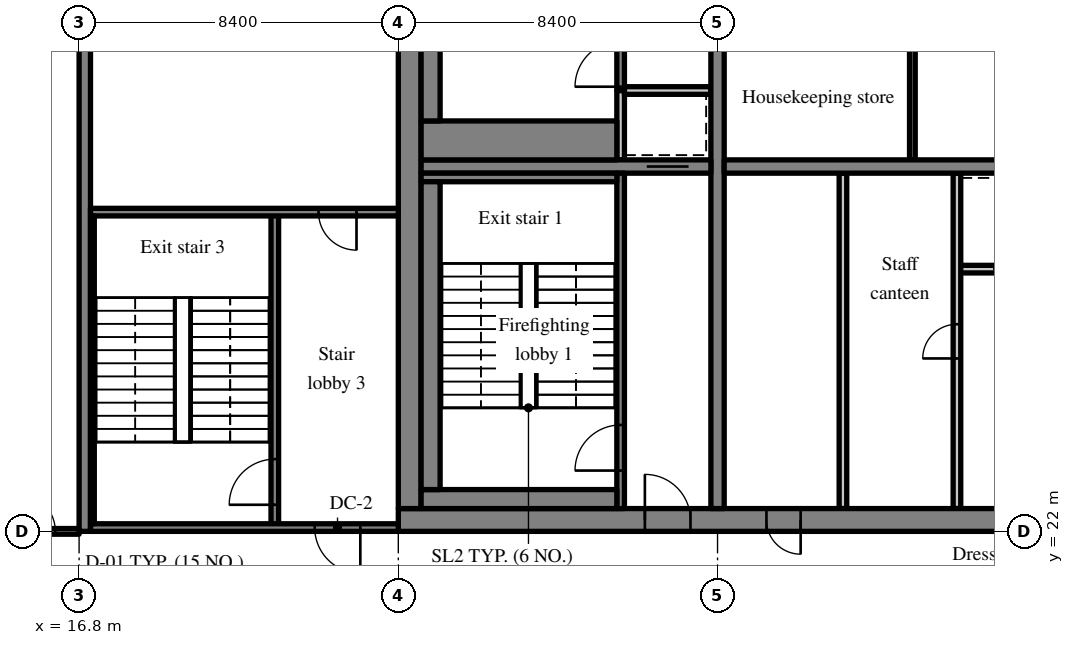
"""IFC4 building model, lengths in metres.
Left out: names, types, materials, properties, quantities, classifications, styles, units other than length and angle.
Written with IfcOpenShell. Run it as: python <this file> out.ifc"""

import sys

from ifc_helpers import new_model, si_unit, direction, frame, frame_2d, origin, place, context, subcontext, project, spatial, rectangle, extrude, source, transform, mapped, element, fill, save


model = new_model("IFC4")
c1 = context("Model", 3, precision=1e-05, world=origin(), true_north=direction((0.0, 1.0)))
c2 = subcontext(c1, "Body", "Model", "MODEL_VIEW")
j1 = project(units=[si_unit("LENGTHUNIT", "METRE"), si_unit("PLANEANGLEUNIT", "RADIAN")], contexts=[c1])
p1 = place(None, origin())
s1 = spatial("IfcSite", under=j1, at=p1, CompositionType="ELEMENT")
p2 = place(p1, origin())
s2 = spatial("IfcBuilding", under=s1, at=p2, CompositionType="ELEMENT")
p3 = place(p2, frame((0.0, 0.0, 260.8)))
s3 = spatial("IfcBuildingStorey", under=s2, at=p3, CompositionType="ELEMENT", Elevation=260.8)
m1 = source(origin(), c2, "Body", "SweptSolid", [
    extrude(rectangle(XDim=50.4, YDim=0.6, at=frame_2d((25.2, 0.0))), origin(), (0.0, 0.0, 1.0), 3.62),
])
p4 = place(p3, frame((25.2, 22.3, 0.0), z_axis=(0.0, 0.0, 1.0), x_axis=(1.0, 0.0, 0.0)))
e1 = element("IfcWall", 1, at=p4, inside=s3, PredefinedType="SHEAR", context=c2, shape_type="MappedRepresentation", body=[
    mapped(m1, transform((0.0, 0.0, 0.0), scale=1.0)),
])
m2 = source(origin(), c2, "Body", "SweptSolid", [
    extrude(rectangle(XDim=1.8, YDim=2.1, at=frame_2d((0.9, 1.05))), frame((0.0, 0.31, 0.0), z_axis=(0.0, -1.0, 0.0), x_axis=(1.0, 0.0, 0.0)), (0.0, 0.0, 1.0), 0.62),
])
p5 = place(p4, frame((15.9, 0.0, 0.0)))
e2 = element("IfcOpeningElement", 2, at=p5, cuts=e1, PredefinedType="OPENING", context=c2, shape_type="MappedRepresentation", body=[
    mapped(m2, transform((0.0, 0.0, 0.0), scale=1.0)),
])
m3 = source(origin(), c2, "Body", "SweptSolid", [
    extrude(rectangle(XDim=0.9, YDim=2.1, at=frame_2d((0.45, 1.05))), frame((0.0, 0.31, 0.0), z_axis=(0.0, -1.0, 0.0), x_axis=(1.0, 0.0, 0.0)), (0.0, 0.0, 1.0), 0.62),
])
p6 = place(p4, frame((9.687, 0.0, 0.0)))
e3 = element("IfcOpeningElement", 3, at=p6, cuts=e1, PredefinedType="OPENING", context=c2, shape_type="MappedRepresentation", body=[
    mapped(m3, transform((0.0, 0.0, 0.0), scale=1.0)),
])
p7 = place(p4, frame((21.513, 0.0, 0.0)))
e4 = element("IfcOpeningElement", 4, at=p7, cuts=e1, PredefinedType="OPENING", context=c2, shape_type="MappedRepresentation", body=[
    mapped(m3, transform((0.0, 0.0, 0.0), scale=1.0)),
])
p8 = place(p4, frame((32.7, 0.0, 0.0)))
e5 = element("IfcOpeningElement", 5, at=p8, cuts=e1, PredefinedType="OPENING", context=c2, shape_type="MappedRepresentation", body=[
    mapped(m2, transform((0.0, 0.0, 0.0), scale=1.0)),
])
m4 = source(origin(), c2, "Body", "SweptSolid", [
    extrude(rectangle(XDim=1.2, YDim=2.1, at=frame_2d((0.6, 1.05))), frame((0.0, 0.31, 0.0), z_axis=(0.0, -1.0, 0.0), x_axis=(1.0, 0.0, 0.0)), (0.0, 0.0, 1.0), 0.62),
])
p9 = place(p4, frame((6.488, 0.0, 0.0)))
e6 = element("IfcOpeningElement", 6, at=p9, cuts=e1, PredefinedType="OPENING", context=c2, shape_type="MappedRepresentation", body=[
    mapped(m4, transform((0.0, 0.0, 0.0), scale=1.0)),
])
p10 = place(p4, frame((47.925, 0.0, 0.0)))
e7 = element("IfcOpeningElement", 7, at=p10, cuts=e1, PredefinedType="OPENING", context=c2, shape_type="MappedRepresentation", body=[
    mapped(m4, transform((0.0, 0.0, 0.0), scale=1.0)),
])
m5 = source(origin(), c2, "Body", "SweptSolid", [
    extrude(rectangle(XDim=18.8, YDim=0.6, at=frame_2d((9.4, 0.0))), origin(), (0.0, 0.0, 1.0), 3.62),
])
p11 = place(p3, frame((25.5, 22.6, 0.0), z_axis=(0.0, 0.0, 1.0), x_axis=(0.0, 1.0, 0.0)))
e8 = element("IfcWall", 8, at=p11, inside=s3, PredefinedType="SHEAR", context=c2, shape_type="MappedRepresentation", body=[
    mapped(m5, transform((0.0, 0.0, 0.0), scale=1.0)),
])
m6 = source(origin(), c2, "Body", "SweptSolid", [
    extrude(rectangle(XDim=18.8, YDim=0.35, at=frame_2d((9.4, 0.0))), origin(), (0.0, 0.0, 1.0), 3.62),
])
p12 = place(p3, frame((33.6, 22.6, 0.0), z_axis=(0.0, 0.0, 1.0), x_axis=(0.0, 1.0, 0.0)))
e9 = element("IfcWall", 9, at=p12, inside=s3, PredefinedType="SHEAR", context=c2, shape_type="MappedRepresentation", body=[
    mapped(m6, transform((0.0, 0.0, 0.0), scale=1.0)),
])
m7 = source(origin(), c2, "Body", "SweptSolid", [
    extrude(rectangle(XDim=1.1, YDim=2.1, at=frame_2d((0.55, 1.05))), frame((0.0, 0.185, 0.0), z_axis=(0.0, -1.0, 0.0), x_axis=(1.0, 0.0, 0.0)), (0.0, 0.0, 1.0), 0.37),
])
p13 = place(p12, frame((12.85, 0.0, 0.0)))
e10 = element("IfcOpeningElement", 10, at=p13, cuts=e9, PredefinedType="OPENING", context=c2, shape_type="MappedRepresentation", body=[
    mapped(m7, transform((0.0, 0.0, 0.0), scale=1.0)),
])
m8 = source(origin(), c2, "Body", "SweptSolid", [
    extrude(rectangle(XDim=7.625, YDim=0.35, at=frame_2d((3.812, 0.0))), origin(), (0.0, 0.0, 1.0), 3.62),
])
p14 = place(p3, frame((25.8, 31.6, 0.0), z_axis=(0.0, 0.0, 1.0), x_axis=(1.0, 0.0, 0.0)))
e11 = element("IfcWall", 11, at=p14, inside=s3, PredefinedType="SHEAR", context=c2, shape_type="MappedRepresentation", body=[
    mapped(m8, transform((0.0, 0.0, 0.0), scale=1.0)),
])
p15 = place(p14, frame((5.938, 0.0, 0.0)))
e12 = element("IfcOpeningElement", 12, at=p15, cuts=e11, PredefinedType="OPENING", context=c2, shape_type="MappedRepresentation", body=[
    mapped(m7, transform((0.0, 0.0, 0.0), scale=1.0)),
])
m9 = source(origin(), c2, "Body", "SweptSolid", [
    extrude(rectangle(XDim=16.45, YDim=0.35, at=frame_2d((8.225, 0.0))), origin(), (0.0, 0.0, 1.0), 3.62),
])
p16 = place(p3, frame((33.775, 31.6, 0.0), z_axis=(0.0, 0.0, 1.0), x_axis=(1.0, 0.0, 0.0)))
e13 = element("IfcWall", 13, at=p16, inside=s3, PredefinedType="SHEAR", context=c2, shape_type="MappedRepresentation", body=[
    mapped(m9, transform((0.0, 0.0, 0.0), scale=1.0)),
])
m10 = source(origin(), c2, "Body", "SweptSolid", [
    extrude(rectangle(XDim=1.0, YDim=2.1, at=frame_2d((0.5, 1.05))), frame((0.0, 0.185, 0.0), z_axis=(0.0, -1.0, 0.0), x_axis=(1.0, 0.0, 0.0)), (0.0, 0.0, 1.0), 0.37),
])
p17 = place(p16, frame((14.837, 0.0, 0.0)))
e14 = element("IfcOpeningElement", 14, at=p17, cuts=e13, PredefinedType="OPENING", context=c2, shape_type="MappedRepresentation", body=[
    mapped(m10, transform((0.0, 0.0, 0.0), scale=1.0)),
])
m11 = source(origin(), c2, "Body", "SweptSolid", [
    extrude(rectangle(XDim=18.4, YDim=0.3, at=frame_2d((9.2, 0.0))), origin(), (0.0, 0.0, 1.0), 3.62),
])
p18 = place(p3, frame((16.95, 22.0, 0.0), z_axis=(0.0, 0.0, 1.0), x_axis=(0.0, 1.0, 0.0)))
e15 = element("IfcWall", 15, at=p18, inside=s3, PredefinedType="SHEAR", context=c2, shape_type="MappedRepresentation", body=[
    mapped(m11, transform((0.0, 0.0, 0.0), scale=1.0)),
])
m12 = source(origin(), c2, "Body", "SweptSolid", [
    extrude(rectangle(XDim=6.0, YDim=0.2, at=frame_2d((3.0, 0.0))), origin(), (0.0, 0.0, 1.0), 3.62),
])
p19 = place(p3, frame((39.9, 28.9, 0.0), z_axis=(0.0, 0.0, 1.0), x_axis=(1.0, 0.0, 0.0)))
e16 = element("IfcWall", 16, at=p19, inside=s3, PredefinedType="SOLIDWALL", context=c2, shape_type="MappedRepresentation", body=[
    mapped(m12, transform((0.0, 0.0, 0.0), scale=1.0)),
])
m13 = source(origin(), c2, "Body", "SweptSolid", [
    extrude(rectangle(XDim=1.1, YDim=2.1, at=frame_2d((0.55, 1.05))), frame((0.0, 0.11, 0.0), z_axis=(0.0, -1.0, 0.0), x_axis=(1.0, 0.0, 0.0)), (0.0, 0.0, 1.0), 0.22),
])
p20 = place(p19, frame((0.95, 0.0, 0.0)))
e17 = element("IfcOpeningElement", 17, at=p20, cuts=e16, PredefinedType="OPENING", context=c2, shape_type="MappedRepresentation", body=[
    mapped(m13, transform((0.0, 0.0, 0.0), scale=1.0)),
])
p21 = place(p19, frame((3.95, 0.0, 0.0)))
e18 = element("IfcOpeningElement", 18, at=p21, cuts=e16, PredefinedType="OPENING", context=c2, shape_type="MappedRepresentation", body=[
    mapped(m13, transform((0.0, 0.0, 0.0), scale=1.0)),
])
m14 = source(origin(), c2, "Body", "SweptSolid", [
    extrude(rectangle(XDim=8.825, YDim=0.2, at=frame_2d((4.413, 0.0))), origin(), (0.0, 0.0, 1.0), 3.62),
])
p22 = place(p3, frame((39.9, 22.6, 0.0), z_axis=(0.0, 0.0, 1.0), x_axis=(0.0, 1.0, 0.0)))
e19 = element("IfcWall", 19, at=p22, inside=s3, PredefinedType="PARTITIONING", context=c2, shape_type="MappedRepresentation", body=[
    mapped(m14, transform((0.0, 0.0, 0.0), scale=1.0)),
])
m15 = source(origin(), c2, "Body", "SweptSolid", [
    extrude(rectangle(XDim=0.9, YDim=2.1, at=frame_2d((0.45, 1.05))), frame((0.0, 0.11, 0.0), z_axis=(0.0, -1.0, 0.0), x_axis=(1.0, 0.0, 0.0)), (0.0, 0.0, 1.0), 0.22),
])
p23 = place(p22, frame((3.95, 0.0, 0.0)))
e20 = element("IfcOpeningElement", 20, at=p23, cuts=e19, PredefinedType="OPENING", context=c2, shape_type="MappedRepresentation", body=[
    mapped(m15, transform((0.0, 0.0, 0.0), scale=1.0)),
])
p24 = place(p3, frame((36.9, 22.6, 0.0), z_axis=(0.0, 0.0, 1.0), x_axis=(0.0, 1.0, 0.0)))
e21 = element("IfcWall", 21, at=p24, inside=s3, PredefinedType="PARTITIONING", context=c2, shape_type="MappedRepresentation", body=[
    mapped(m14, transform((0.0, 0.0, 0.0), scale=1.0)),
])
m16 = source(origin(), c2, "Body", "SweptSolid", [
    extrude(rectangle(XDim=3.225, YDim=0.15, at=frame_2d((1.613, 0.0))), origin(), (0.0, 0.0, 1.0), 3.62),
])
p25 = place(p3, frame((38.727, 31.775, 0.0), z_axis=(0.0, 0.0, 1.0), x_axis=(0.0, 1.0, 0.0)))
e22 = element("IfcWall", 22, at=p25, inside=s3, PredefinedType="PARTITIONING", context=c2, shape_type="MappedRepresentation", body=[
    mapped(m16, transform((0.0, 0.0, 0.0), scale=1.0)),
])
m17 = source(origin(), c2, "Body", "SweptSolid", [
    extrude(rectangle(XDim=8.825, YDim=0.2, at=frame_2d((4.413, 0.0))), origin(), (0.0, 0.0, 1.0), 3.62),
])
p26 = place(p3, frame((31.05, 22.6, 0.0), z_axis=(0.0, 0.0, 1.0), x_axis=(0.0, 1.0, 0.0)))
e23 = element("IfcWall", 23, at=p26, inside=s3, PredefinedType="SOLIDWALL", context=c2, shape_type="MappedRepresentation", body=[
    mapped(m17, transform((0.0, 0.0, 0.0), scale=1.0)),
])
m18 = source(origin(), c2, "Body", "SweptSolid", [
    extrude(rectangle(XDim=1.2, YDim=2.1, at=frame_2d((0.6, 1.05))), frame((0.0, 0.11, 0.0), z_axis=(0.0, -1.0, 0.0), x_axis=(1.0, 0.0, 0.0)), (0.0, 0.0, 1.0), 0.22),
])
p27 = place(p26, frame((1.0, 0.0, 0.0)))
e24 = element("IfcOpeningElement", 24, at=p27, cuts=e23, PredefinedType="OPENING", context=c2, shape_type="MappedRepresentation", body=[
    mapped(m18, transform((0.0, 0.0, 0.0), scale=1.0)),
])
m19 = source(origin(), c2, "Body", "SweptSolid", [
    extrude(rectangle(XDim=1.825, YDim=0.2, at=frame_2d((0.913, 0.0))), origin(), (0.0, 0.0, 1.0), 3.62),
])
p28 = place(p3, frame((31.05, 31.775, 0.0), z_axis=(0.0, 0.0, 1.0), x_axis=(0.0, 1.0, 0.0)))
e25 = element("IfcWall", 25, at=p28, inside=s3, PredefinedType="SOLIDWALL", context=c2, shape_type="MappedRepresentation", body=[
    mapped(m19, transform((0.0, 0.0, 0.0), scale=1.0)),
])
m20 = source(origin(), c2, "Body", "SweptSolid", [
    extrude(rectangle(XDim=2.275, YDim=0.2, at=frame_2d((1.138, 0.0))), origin(), (0.0, 0.0, 1.0), 3.62),
])
p29 = place(p3, frame((31.15, 33.6, 0.0), z_axis=(0.0, 0.0, 1.0), x_axis=(1.0, 0.0, 0.0)))
e26 = element("IfcWall", 26, at=p29, inside=s3, PredefinedType="SOLIDWALL", context=c2, shape_type="MappedRepresentation", body=[
    mapped(m20, transform((0.0, 0.0, 0.0), scale=1.0)),
])
m21 = source(origin(), c2, "Body", "SweptSolid", [
    extrude(rectangle(XDim=7.8, YDim=0.2, at=frame_2d((3.9, 0.0))), origin(), (0.0, 0.0, 1.0), 3.62),
])
p30 = place(p3, frame((31.05, 33.6, 0.0), z_axis=(0.0, 0.0, 1.0), x_axis=(0.0, 1.0, 0.0)))
e27 = element("IfcWall", 27, at=p30, inside=s3, PredefinedType="SOLIDWALL", context=c2, shape_type="MappedRepresentation", body=[
    mapped(m21, transform((0.0, 0.0, 0.0), scale=1.0)),
])
p31 = place(p30, frame((0.1, 0.0, 0.0)))
e28 = element("IfcOpeningElement", 28, at=p31, cuts=e27, PredefinedType="OPENING", context=c2, shape_type="MappedRepresentation", body=[
    mapped(m18, transform((0.0, 0.0, 0.0), scale=1.0)),
])
m22 = source(origin(), c2, "Body", "SweptSolid", [
    extrude(rectangle(XDim=8.3, YDim=0.2, at=frame_2d((4.15, 0.0))), origin(), (0.0, 0.0, 1.0), 3.62),
])
p32 = place(p3, frame((21.95, 22.1, 0.0), z_axis=(0.0, 0.0, 1.0), x_axis=(0.0, 1.0, 0.0)))
e29 = element("IfcWall", 29, at=p32, inside=s3, PredefinedType="SOLIDWALL", context=c2, shape_type="MappedRepresentation", body=[
    mapped(m22, transform((0.0, 0.0, 0.0), scale=1.0)),
])
p33 = place(p32, frame((0.6, 0.0, 0.0)))
e30 = element("IfcOpeningElement", 30, at=p33, cuts=e29, PredefinedType="OPENING", context=c2, shape_type="MappedRepresentation", body=[
    mapped(m18, transform((0.0, 0.0, 0.0), scale=1.0)),
])
m23 = source(origin(), c2, "Body", "SweptSolid", [
    extrude(rectangle(XDim=8.1, YDim=0.2, at=frame_2d((4.05, 0.0))), origin(), (0.0, 0.0, 1.0), 3.62),
])
p34 = place(p3, frame((17.1, 22.1, 0.0), z_axis=(0.0, 0.0, 1.0), x_axis=(1.0, 0.0, 0.0)))
e31 = element("IfcWall", 31, at=p34, inside=s3, PredefinedType="SOLIDWALL", context=c2, shape_type="MappedRepresentation", body=[
    mapped(m23, transform((0.0, 0.0, 0.0), scale=1.0)),
])
p35 = place(p34, frame((5.9, 0.0, 0.0)))
e32 = element("IfcOpeningElement", 32, at=p35, cuts=e31, PredefinedType="OPENING", context=c2, shape_type="MappedRepresentation", body=[
    mapped(m18, transform((0.0, 0.0, 0.0), scale=1.0)),
])
p36 = place(p3, frame((17.1, 30.4, 0.0), z_axis=(0.0, 0.0, 1.0), x_axis=(1.0, 0.0, 0.0)))
e33 = element("IfcWall", 33, at=p36, inside=s3, PredefinedType="SOLIDWALL", context=c2, shape_type="MappedRepresentation", body=[
    mapped(m23, transform((0.0, 0.0, 0.0), scale=1.0)),
])
m24 = source(origin(), c2, "Body", "SweptSolid", [
    extrude(rectangle(XDim=1.0, YDim=2.1, at=frame_2d((0.5, 1.05))), frame((0.0, 0.11, 0.0), z_axis=(0.0, -1.0, 0.0), x_axis=(1.0, 0.0, 0.0)), (0.0, 0.0, 1.0), 0.22),
])
p37 = place(p36, frame((6.0, 0.0, 0.0)))
e34 = element("IfcOpeningElement", 34, at=p37, cuts=e33, PredefinedType="OPENING", context=c2, shape_type="MappedRepresentation", body=[
    mapped(m24, transform((0.0, 0.0, 0.0), scale=1.0)),
])
m25 = source(origin(), c2, "Body", "SweptSolid", [
    extrude(rectangle(XDim=5.15, YDim=0.5, at=frame_2d((2.575, 0.0))), origin(), (0.0, 0.0, 1.0), 3.62),
])
p38 = place(p3, frame((25.8, 22.85, 0.0), z_axis=(0.0, 0.0, 1.0), x_axis=(1.0, 0.0, 0.0)))
e35 = element("IfcWall", 35, at=p38, inside=s3, PredefinedType="SOLIDWALL", context=c2, shape_type="MappedRepresentation", body=[
    mapped(m25, transform((0.0, 0.0, 0.0), scale=1.0)),
])
m26 = source(origin(), c2, "Body", "SweptSolid", [
    extrude(rectangle(XDim=5.15, YDim=0.225, at=frame_2d((2.575, 0.0))), origin(), (0.0, 0.0, 1.0), 3.62),
])
p39 = place(p3, frame((25.8, 31.312, 0.0), z_axis=(0.0, 0.0, 1.0), x_axis=(1.0, 0.0, 0.0)))
e36 = element("IfcWall", 36, at=p39, inside=s3, PredefinedType="SOLIDWALL", context=c2, shape_type="MappedRepresentation", body=[
    mapped(m26, transform((0.0, 0.0, 0.0), scale=1.0)),
])
m27 = source(origin(), c2, "Body", "SweptSolid", [
    extrude(rectangle(XDim=8.1, YDim=0.5, at=frame_2d((4.05, 0.0))), origin(), (0.0, 0.0, 1.0), 3.62),
])
p40 = place(p3, frame((26.05, 23.1, 0.0), z_axis=(0.0, 0.0, 1.0), x_axis=(0.0, 1.0, 0.0)))
e37 = element("IfcWall", 37, at=p40, inside=s3, PredefinedType="SOLIDWALL", context=c2, shape_type="MappedRepresentation", body=[
    mapped(m27, transform((0.0, 0.0, 0.0), scale=1.0)),
])
m28 = source(origin(), c2, "Body", "SweptSolid", [
    extrude(rectangle(XDim=8.1, YDim=0.1, at=frame_2d((4.05, 0.0))), origin(), (0.0, 0.0, 1.0), 3.62),
])
p41 = place(p3, frame((17.15, 22.2, 0.0), z_axis=(0.0, 0.0, 1.0), x_axis=(0.0, 1.0, 0.0)))
e38 = element("IfcWall", 38, at=p41, inside=s3, PredefinedType="SOLIDWALL", context=c2, shape_type="MappedRepresentation", body=[
    mapped(m28, transform((0.0, 0.0, 0.0), scale=1.0)),
])
m29 = source(origin(), c2, "Body", "SweptSolid", [
    extrude(rectangle(XDim=5.15, YDim=1.025, at=frame_2d((2.575, 0.0))), origin(), (0.0, 0.0, 1.0), 3.62),
])
p42 = place(p3, frame((25.8, 32.287, 0.0), z_axis=(0.0, 0.0, 1.0), x_axis=(1.0, 0.0, 0.0)))
e39 = element("IfcWall", 39, at=p42, inside=s3, PredefinedType="SOLIDWALL", context=c2, shape_type="MappedRepresentation", body=[
    mapped(m29, transform((0.0, 0.0, 0.0), scale=1.0)),
])
p43 = place(p3, frame((26.05, 32.8, 0.0), z_axis=(0.0, 0.0, 1.0), x_axis=(0.0, 1.0, 0.0)))
e40 = element("IfcWall", 40, at=p43, inside=s3, PredefinedType="SOLIDWALL", context=c2, shape_type="MappedRepresentation", body=[
    mapped(m27, transform((0.0, 0.0, 0.0), scale=1.0)),
])
m30 = source(origin(), c2, "Body", "SweptSolid", [
    extrude(rectangle(XDim=1.9, YDim=0.15, at=frame_2d((0.95, 0.0))), origin(), (0.0, 0.0, 1.0), 2.92),
])
p44 = place(p3, frame((14.9, 22.0, 0.0), z_axis=(0.0, 0.0, 1.0), x_axis=(1.0, 0.0, 0.0)))
e41 = element("IfcWall", 41, at=p44, inside=s3, PredefinedType="PARTITIONING", context=c2, shape_type="MappedRepresentation", body=[
    mapped(m30, transform((0.0, 0.0, 0.0), scale=1.0)),
])
m31 = source(origin(), c2, "Body", "SweptSolid", [
    extrude(rectangle(XDim=1.0, YDim=2.1, at=frame_2d((0.5, 1.05))), frame((0.0, 0.085, 0.0), z_axis=(0.0, -1.0, 0.0), x_axis=(1.0, 0.0, 0.0)), (0.0, 0.0, 1.0), 0.17),
])
p45 = place(p44, frame((0.275, 0.0, 0.0)))
e42 = element("IfcOpeningElement", 42, at=p45, cuts=e41, PredefinedType="OPENING", context=c2, shape_type="MappedRepresentation", body=[
    mapped(m31, transform((0.0, 0.0, 0.0), scale=1.0)),
])
m32 = source(origin(), c2, "Body", "SweptSolid", [
    extrude(rectangle(XDim=1.1, YDim=2.1, at=frame_2d((0.55, 1.05))), frame((0.0, 0.025, 0.0), z_axis=(0.0, -1.0, 0.0), x_axis=(1.0, 0.0, 0.0)), (0.0, 0.0, 1.0), 0.05),
])
p46 = place(p20, origin())
e43 = element("IfcDoor", 43, at=p46, inside=s3, OperationType="SLIDING_TO_LEFT", PredefinedType="DOOR", context=c2, shape_type="MappedRepresentation", body=[
    mapped(m32, transform((0.0, 0.0, 0.0), scale=1.0)),
])
fill(e17, e43)
m33 = source(origin(), c2, "Body", "SweptSolid", [
    extrude(rectangle(XDim=0.9, YDim=2.1, at=frame_2d((0.45, 1.05))), frame((0.0, 0.225, 0.0), z_axis=(0.0, -1.0, 0.0), x_axis=(1.0, 0.0, 0.0)), (0.0, 0.0, 1.0), 0.05),
])
p47 = place(p6, origin())
e44 = element("IfcDoor", 44, at=p47, inside=s3, OperationType="SINGLE_SWING_RIGHT", PredefinedType="DOOR", context=c2, shape_type="MappedRepresentation", body=[
    mapped(m33, transform((0.0, 0.0, 0.0), scale=1.0)),
])
fill(e3, e44)
m34 = source(origin(), c2, "Body", "SweptSolid", [
    extrude(rectangle(XDim=0.9, YDim=2.1, at=frame_2d((0.45, 1.05))), frame((0.0, 0.025, 0.0), z_axis=(0.0, -1.0, 0.0), x_axis=(1.0, 0.0, 0.0)), (0.0, 0.0, 1.0), 0.05),
])
p48 = place(p23, origin())
e45 = element("IfcDoor", 45, at=p48, inside=s3, OperationType="SINGLE_SWING_LEFT", PredefinedType="DOOR", context=c2, shape_type="MappedRepresentation", body=[
    mapped(m34, transform((0.0, 0.0, 0.0), scale=1.0)),
])
fill(e20, e45)
m35 = source(origin(), c2, "Body", "SweptSolid", [
    extrude(rectangle(XDim=1.2, YDim=2.1, at=frame_2d((0.6, 1.05))), frame((0.0, 0.025, 0.0), z_axis=(0.0, -1.0, 0.0), x_axis=(1.0, 0.0, 0.0)), (0.0, 0.0, 1.0), 0.05),
])
p49 = place(p27, origin())
e46 = element("IfcDoor", 46, at=p49, inside=s3, OperationType="SINGLE_SWING_LEFT", PredefinedType="DOOR", context=c2, shape_type="MappedRepresentation", body=[
    mapped(m35, transform((0.0, 0.0, 0.0), scale=1.0)),
])
fill(e24, e46)
m36 = source(origin(), c2, "Body", "SweptSolid", [
    extrude(rectangle(XDim=1.2, YDim=2.1, at=frame_2d((0.6, 1.05))), frame((0.0, 0.225, 0.0), z_axis=(0.0, -1.0, 0.0), x_axis=(1.0, 0.0, 0.0)), (0.0, 0.0, 1.0), 0.05),
])
p50 = place(p9, origin())
e47 = element("IfcDoor", 47, at=p50, inside=s3, OperationType="SINGLE_SWING_LEFT", PredefinedType="DOOR", context=c2, shape_type="MappedRepresentation", body=[
    mapped(m36, transform((0.0, 0.0, 0.0), scale=1.0)),
])
fill(e6, e47)
p51 = place(p15, origin())
e48 = element("IfcDoor", 48, at=p51, inside=s3, OperationType="SLIDING_TO_LEFT", PredefinedType="DOOR", context=c2, shape_type="MappedRepresentation", body=[
    mapped(m32, transform((0.0, 0.0, 0.0), scale=1.0)),
])
fill(e12, e48)
p52 = place(p31, origin())
e49 = element("IfcDoor", 49, at=p52, inside=s3, OperationType="SINGLE_SWING_LEFT", PredefinedType="DOOR", context=c2, shape_type="MappedRepresentation", body=[
    mapped(m35, transform((0.0, 0.0, 0.0), scale=1.0)),
])
fill(e28, e49)
p53 = place(p33, origin())
e50 = element("IfcDoor", 50, at=p53, inside=s3, OperationType="SINGLE_SWING_LEFT", PredefinedType="DOOR", context=c2, shape_type="MappedRepresentation", body=[
    mapped(m35, transform((0.0, 0.0, 0.0), scale=1.0)),
])
fill(e30, e50)
p54 = place(p35, origin())
e51 = element("IfcDoor", 51, at=p54, inside=s3, OperationType="SINGLE_SWING_RIGHT", PredefinedType="DOOR", context=c2, shape_type="MappedRepresentation", body=[
    mapped(m35, transform((0.0, 0.0, 0.0), scale=1.0)),
])
fill(e32, e51)
m37 = source(origin(), c2, "Body", "SweptSolid", [
    extrude(rectangle(XDim=1.0, YDim=2.1, at=frame_2d((0.5, 1.05))), frame((0.0, 0.025, 0.0), z_axis=(0.0, -1.0, 0.0), x_axis=(1.0, 0.0, 0.0)), (0.0, 0.0, 1.0), 0.05),
])
p55 = place(p37, origin())
e52 = element("IfcDoor", 52, at=p55, inside=s3, OperationType="SINGLE_SWING_RIGHT", PredefinedType="DOOR", context=c2, shape_type="MappedRepresentation", body=[
    mapped(m37, transform((0.0, 0.0, 0.0), scale=1.0)),
])
fill(e34, e52)
p56 = place(p45, origin())
e53 = element("IfcDoor", 53, at=p56, inside=s3, OperationType="SINGLE_SWING_LEFT", PredefinedType="DOOR", context=c2, shape_type="MappedRepresentation", body=[
    mapped(m37, transform((0.0, 0.0, 0.0), scale=1.0)),
])
fill(e42, e53)
save(model, sys.argv[1])
